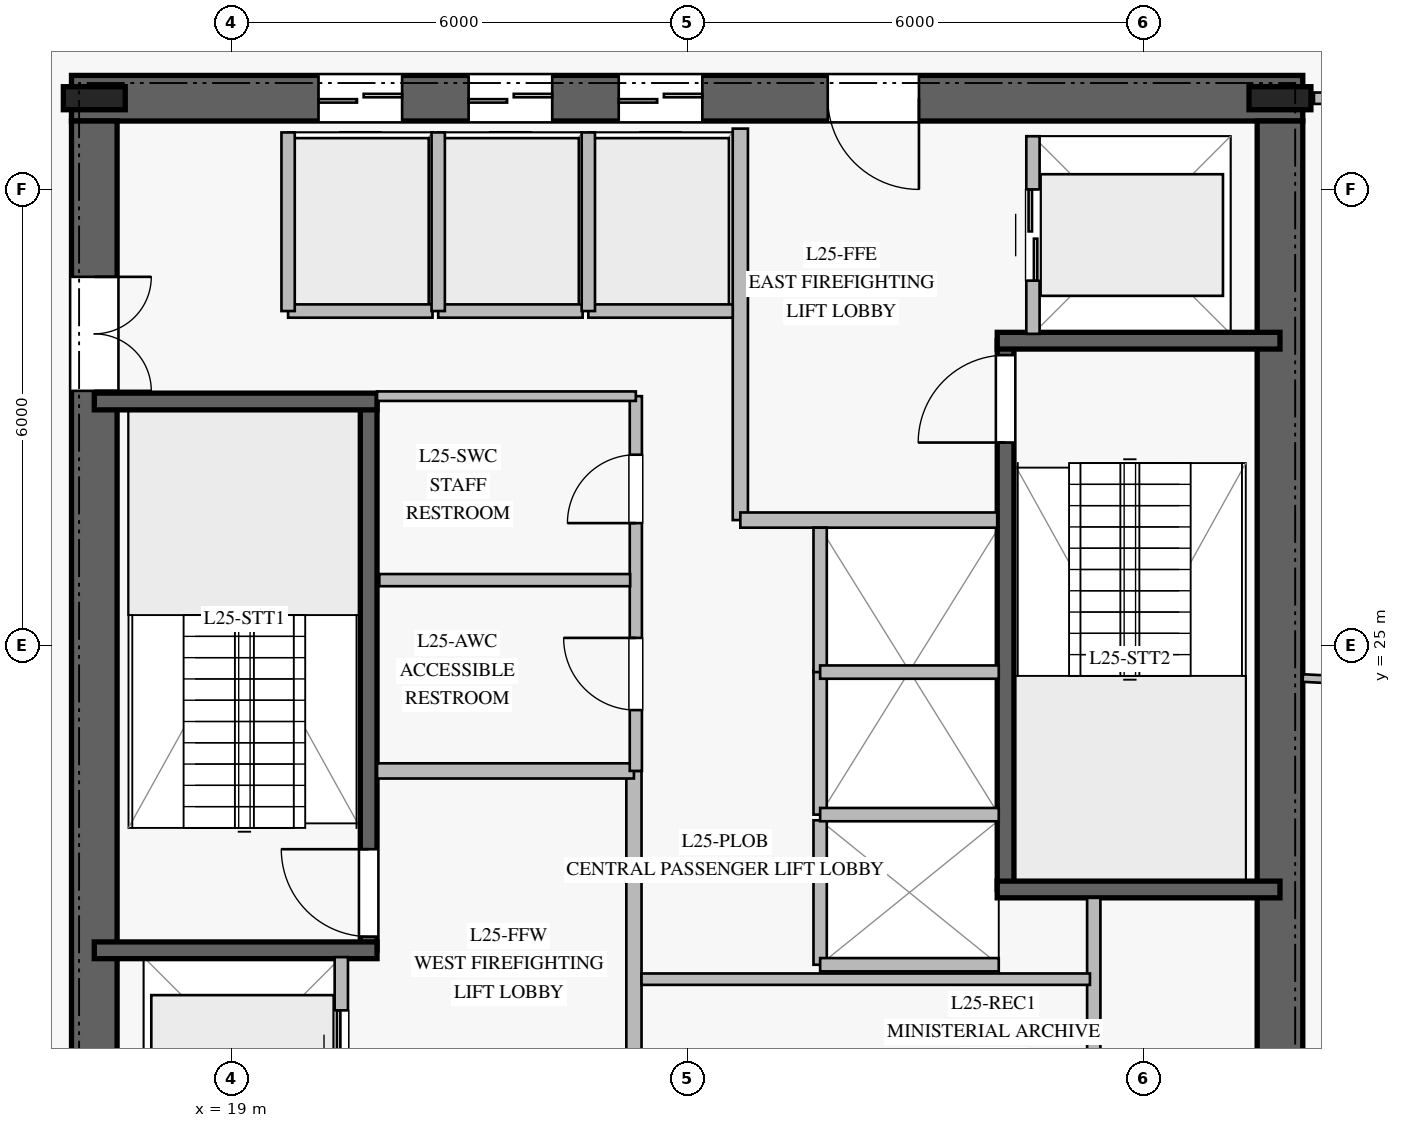
"""IFC4 building model, lengths in metres.
Left out: names, types, materials, properties, quantities, classifications, styles, units other than length and angle.
Written with IfcOpenShell. Run it as: python <this file> out.ifc"""

import sys

from ifc_helpers import new_model, si_unit, direction, frame, frame_2d, origin, origin_2d, place, context, subcontext, project, spatial, rectangle, i_section, extrude, element, fill, save


model = new_model("IFC4")
c1 = context("Model", 3, precision=1e-05, world=origin(), true_north=direction((0.0, 1.0)))
c2 = subcontext(c1, "Body", "Model", "MODEL_VIEW")
j1 = project(units=[si_unit("LENGTHUNIT", "METRE"), si_unit("PLANEANGLEUNIT", "RADIAN")], contexts=[c1])
p1 = place(None, origin())
s1 = spatial("IfcSite", under=j1, at=p1, CompositionType="ELEMENT")
p2 = place(p1, origin())
s2 = spatial("IfcBuilding", under=s1, at=p2, CompositionType="ELEMENT")
p3 = place(p2, frame((0.0, 0.0, 106.4)))
s3 = spatial("IfcBuildingStorey", under=s2, at=p3, CompositionType="ELEMENT", Elevation=106.4)
p4 = place(p3, frame((33.1, 32.2, 0.0), z_axis=(0.0, 0.0, 1.0), x_axis=(-1.0, 0.0, 0.0)))
e1 = element("IfcWall", 1, at=p4, inside=s3, PredefinedType="SHEAR", context=c2, shape_type="SweptSolid", body=[
    extrude(rectangle(XDim=16.2, YDim=0.6, at=frame_2d((8.1, 0.0))), origin(), (0.0, 0.0, 1.0), 3.76),
])
p5 = place(p4, frame((5.05, 0.0, 0.0)))
e2 = element("IfcOpeningElement", 2, at=p5, cuts=e1, PredefinedType="OPENING", context=c2, shape_type="SweptSolid", body=[
    extrude(rectangle(XDim=1.2, YDim=2.25, at=frame_2d((0.6, 1.125))), frame((0.0, 0.31, 0.0), z_axis=(0.0, -1.0, 0.0), x_axis=(1.0, 0.0, 0.0)), (0.0, 0.0, 1.0), 0.62),
])
p6 = place(p4, frame((11.85, 0.0, 0.0)))
e3 = element("IfcOpeningElement", 3, at=p6, cuts=e1, PredefinedType="OPENING", context=c2, shape_type="SweptSolid", body=[
    extrude(rectangle(XDim=1.1, YDim=2.2, at=frame_2d((0.55, 1.1))), frame((0.0, 0.31, 0.0), z_axis=(0.0, -1.0, 0.0), x_axis=(1.0, 0.0, 0.0)), (0.0, 0.0, 1.0), 0.62),
])
p7 = place(p4, frame((9.875, 0.0, 0.0)))
e4 = element("IfcOpeningElement", 4, at=p7, cuts=e1, PredefinedType="OPENING", context=c2, shape_type="SweptSolid", body=[
    extrude(rectangle(XDim=1.1, YDim=2.2, at=frame_2d((0.55, 1.1))), frame((0.0, 0.31, 0.0), z_axis=(0.0, -1.0, 0.0), x_axis=(1.0, 0.0, 0.0)), (0.0, 0.0, 1.0), 0.62),
])
p8 = place(p4, frame((7.9, 0.0, 0.0)))
e5 = element("IfcOpeningElement", 5, at=p8, cuts=e1, PredefinedType="OPENING", context=c2, shape_type="SweptSolid", body=[
    extrude(rectangle(XDim=1.1, YDim=2.2, at=frame_2d((0.55, 1.1))), frame((0.0, 0.31, 0.0), z_axis=(0.0, -1.0, 0.0), x_axis=(1.0, 0.0, 0.0)), (0.0, 0.0, 1.0), 0.62),
])
p9 = place(p3, frame((17.2, 31.9, 0.0), z_axis=(0.0, 0.0, 1.0), x_axis=(0.0, -1.0, 0.0)))
e6 = element("IfcWall", 6, at=p9, inside=s3, PredefinedType="SHEAR", context=c2, shape_type="SweptSolid", body=[
    extrude(rectangle(XDim=13.8, YDim=0.6, at=frame_2d((6.9, 0.0))), origin(), (0.0, 0.0, 1.0), 3.76),
])
p10 = place(p9, frame((2.05, 0.0, 0.0)))
e7 = element("IfcOpeningElement", 7, at=p10, cuts=e6, PredefinedType="OPENING", context=c2, shape_type="SweptSolid", body=[
    extrude(rectangle(XDim=1.5, YDim=2.2, at=frame_2d((0.75, 1.1))), frame((0.0, 0.31, 0.0), z_axis=(0.0, -1.0, 0.0), x_axis=(1.0, 0.0, 0.0)), (0.0, 0.0, 1.0), 0.62),
])
p11 = place(p3, frame((32.8, 18.1, 0.0), z_axis=(0.0, 0.0, 1.0), x_axis=(0.0, 1.0, 0.0)))
e8 = element("IfcWall", 8, at=p11, inside=s3, PredefinedType="SHEAR", context=c2, shape_type="SweptSolid", body=[
    extrude(rectangle(XDim=13.8, YDim=0.6, at=frame_2d((6.9, 0.0))), origin(), (0.0, 0.0, 1.0), 3.76),
])
for number, where, z_axis, x_axis in (
    (9, (32.8, 32.2, 0.0), (0.0, 0.0, 1.0), (1.0, 0.0, 0.0)),
    (10, (17.2, 32.2, 0.0), (0.0, 0.0, 1.0), (1.0, 0.0, 0.0)),
):
    element("IfcColumn", number, at=place(p3, frame(where, z_axis=z_axis, x_axis=x_axis)), inside=s3, PredefinedType="COLUMN", context=c2, shape_type="SweptSolid", body=[
        extrude(i_section(OverallWidth=0.303, OverallDepth=0.814, WebThickness=0.021, FlangeThickness=0.04, at=origin_2d()), origin(), (0.0, 0.0, 1.0), 4.0),
    ])
p12 = place(p3, frame((20.81, 20.99, 0.0), z_axis=(0.0, 0.0, 1.0), x_axis=(0.0, 1.0, 0.0)))
e11 = element("IfcWall", 11, at=p12, inside=s3, PredefinedType="SOLIDWALL", context=c2, shape_type="SweptSolid", body=[
    extrude(rectangle(XDim=7.22, YDim=0.22, at=frame_2d((3.61, 0.0))), origin(), (0.0, 0.0, 1.0), 3.76),
])
p13 = place(p12, frame((0.18, 0.0, 0.0)))
e12 = element("IfcOpeningElement", 12, at=p13, cuts=e11, PredefinedType="OPENING", context=c2, shape_type="SweptSolid", body=[
    extrude(rectangle(XDim=1.15, YDim=2.2, at=frame_2d((0.575, 1.1))), frame((0.0, 0.12, 0.0), z_axis=(0.0, -1.0, 0.0), x_axis=(1.0, 0.0, 0.0)), (0.0, 0.0, 1.0), 0.24),
])
for number, where, z_axis, x_axis in (
    (13, (17.2, 20.99, 0.0), (0.0, 0.0, 1.0), (1.0, 0.0, 0.0)),
    (14, (17.2, 28.21, 0.0), (0.0, 0.0, 1.0), (1.0, 0.0, 0.0)),
):
    element("IfcWall", number, at=place(p3, frame(where, z_axis=z_axis, x_axis=x_axis)), inside=s3, PredefinedType="SOLIDWALL", context=c2, shape_type="SweptSolid", body=[
        extrude(rectangle(XDim=3.72, YDim=0.22, at=frame_2d((1.86, 0.0))), origin(), (0.0, 0.0, 1.0), 3.76),
    ])
p14 = place(p3, frame((29.19, 21.79, 0.0), z_axis=(0.0, 0.0, 1.0), x_axis=(0.0, 1.0, 0.0)))
e15 = element("IfcWall", 15, at=p14, inside=s3, PredefinedType="SOLIDWALL", context=c2, shape_type="SweptSolid", body=[
    extrude(rectangle(XDim=7.22, YDim=0.22, at=frame_2d((3.61, 0.0))), origin(), (0.0, 0.0, 1.0), 3.76),
])
p15 = place(p14, frame((5.88, 0.0, 0.0)))
e16 = element("IfcOpeningElement", 16, at=p15, cuts=e15, PredefinedType="OPENING", context=c2, shape_type="SweptSolid", body=[
    extrude(rectangle(XDim=1.15, YDim=2.2, at=frame_2d((0.575, 1.1))), frame((0.0, 0.12, 0.0), z_axis=(0.0, -1.0, 0.0), x_axis=(1.0, 0.0, 0.0)), (0.0, 0.0, 1.0), 0.24),
])
for number, where, z_axis, x_axis in (
    (17, (29.08, 21.79, 0.0), (0.0, 0.0, 1.0), (1.0, 0.0, 0.0)),
    (18, (29.08, 29.01, 0.0), (0.0, 0.0, 1.0), (1.0, 0.0, 0.0)),
):
    element("IfcWall", number, at=place(p3, frame(where, z_axis=z_axis, x_axis=x_axis)), inside=s3, PredefinedType="SOLIDWALL", context=c2, shape_type="SweptSolid", body=[
        extrude(rectangle(XDim=3.72, YDim=0.22, at=frame_2d((1.86, 0.0))), origin(), (0.0, 0.0, 1.0), 3.76),
    ])
p16 = place(p3, frame((24.3, 18.2, 0.0), z_axis=(0.0, 0.0, 1.0), x_axis=(0.0, 1.0, 0.0)))
e19 = element("IfcWall", 19, at=p16, inside=s3, PredefinedType="PARTITIONING", context=c2, shape_type="SweptSolid", body=[
    extrude(rectangle(XDim=5.15, YDim=0.2, at=frame_2d((2.575, 0.0))), origin(), (0.0, 0.0, 1.0), 3.76),
])
p17 = place(p3, frame((20.92, 23.35, 0.0), z_axis=(0.0, 0.0, 1.0), x_axis=(1.0, 0.0, 0.0)))
e20 = element("IfcWall", 20, at=p17, inside=s3, PredefinedType="PARTITIONING", context=c2, shape_type="SweptSolid", body=[
    extrude(rectangle(XDim=3.38, YDim=0.2, at=frame_2d((1.69, 0.0))), origin(), (0.0, 0.0, 1.0), 3.76),
])
p18 = place(p3, frame((25.7, 26.65, 0.0), z_axis=(0.0, 0.0, 1.0), x_axis=(0.0, 1.0, 0.0)))
e21 = element("IfcWall", 21, at=p18, inside=s3, PredefinedType="PARTITIONING", context=c2, shape_type="SweptSolid", body=[
    extrude(rectangle(XDim=5.15, YDim=0.2, at=frame_2d((2.575, 0.0))), origin(), (0.0, 0.0, 1.0), 3.76),
])
p19 = place(p3, frame((25.7, 26.65, 0.0), z_axis=(0.0, 0.0, 1.0), x_axis=(1.0, 0.0, 0.0)))
e22 = element("IfcWall", 22, at=p19, inside=s3, PredefinedType="PARTITIONING", context=c2, shape_type="SweptSolid", body=[
    extrude(rectangle(XDim=3.38, YDim=0.2, at=frame_2d((1.69, 0.0))), origin(), (0.0, 0.0, 1.0), 3.76),
])
p20 = place(p3, frame((24.325, 23.35, 0.0), z_axis=(0.0, 0.0, 1.0), x_axis=(0.0, 1.0, 0.0)))
e23 = element("IfcWall", 23, at=p20, inside=s3, PredefinedType="PLUMBINGWALL", context=c2, shape_type="SweptSolid", body=[
    extrude(rectangle(XDim=4.93, YDim=0.16, at=frame_2d((2.465, 0.0))), origin(), (0.0, 0.0, 1.0), 3.76),
])
p21 = place(p20, frame((0.8, 0.0, 0.0)))
e24 = element("IfcOpeningElement", 24, at=p21, cuts=e23, PredefinedType="OPENING", context=c2, shape_type="SweptSolid", body=[
    extrude(rectangle(XDim=0.95, YDim=2.1, at=frame_2d((0.475, 1.05))), frame((0.0, 0.09, 0.0), z_axis=(0.0, -1.0, 0.0), x_axis=(1.0, 0.0, 0.0)), (0.0, 0.0, 1.0), 0.18),
])
p22 = place(p20, frame((3.26, 0.0, 0.0)))
e25 = element("IfcOpeningElement", 25, at=p22, cuts=e23, PredefinedType="OPENING", context=c2, shape_type="SweptSolid", body=[
    extrude(rectangle(XDim=0.9, YDim=2.1, at=frame_2d((0.45, 1.05))), frame((0.0, 0.09, 0.0), z_axis=(0.0, -1.0, 0.0), x_axis=(1.0, 0.0, 0.0)), (0.0, 0.0, 1.0), 0.18),
])
p23 = place(p3, frame((20.92, 28.28, 0.0), z_axis=(0.0, 0.0, 1.0), x_axis=(1.0, 0.0, 0.0)))
e26 = element("IfcWall", 26, at=p23, inside=s3, PredefinedType="PARTITIONING", context=c2, shape_type="SweptSolid", body=[
    extrude(rectangle(XDim=3.405, YDim=0.125, at=frame_2d((1.703, 0.0))), origin(), (0.0, 0.0, 1.0), 3.76),
])
p24 = place(p3, frame((20.95, 25.86, 0.0), z_axis=(0.0, 0.0, 1.0), x_axis=(1.0, 0.0, 0.0)))
e27 = element("IfcWall", 27, at=p24, inside=s3, PredefinedType="PLUMBINGWALL", context=c2, shape_type="SweptSolid", body=[
    extrude(rectangle(XDim=3.3, YDim=0.16, at=frame_2d((1.65, 0.0))), origin(), (0.0, 0.0, 1.0), 3.76),
])
p25 = place(p3, frame((30.35, 18.2, 0.0), z_axis=(0.0, 0.0, 1.0), x_axis=(0.0, 1.0, 0.0)))
e28 = element("IfcWall", 28, at=p25, inside=s3, PredefinedType="PARTITIONING", context=c2, shape_type="SweptSolid", body=[
    extrude(rectangle(XDim=3.48, YDim=0.175, at=frame_2d((1.74, 0.0))), origin(), (0.0, 0.0, 1.0), 3.76),
])
p26 = place(p3, frame((24.4, 20.61, 0.0), z_axis=(0.0, 0.0, 1.0), x_axis=(1.0, 0.0, 0.0)))
e29 = element("IfcWall", 29, at=p26, inside=s3, PredefinedType="PARTITIONING", context=c2, shape_type="SweptSolid", body=[
    extrude(rectangle(XDim=5.9, YDim=0.15, at=frame_2d((2.95, 0.0))), origin(), (0.0, 0.0, 1.0), 3.76),
])
p27 = place(p3, frame((19.75, 29.4, 0.0), z_axis=(0.0, 0.0, 1.0), x_axis=(1.0, 0.0, 0.0)))
e30 = element("IfcWall", 30, at=p27, inside=s3, PredefinedType="PARTITIONING", context=c2, shape_type="SweptSolid", body=[
    extrude(rectangle(XDim=1.9, YDim=0.175, at=frame_2d((0.95, 0.0))), origin(), (0.0, 0.0, 1.0), 3.76),
])
p28 = place(p3, frame((19.75, 29.4, 0.0), z_axis=(0.0, 0.0, 1.0), x_axis=(0.0, 1.0, 0.0)))
e31 = element("IfcWall", 31, at=p28, inside=s3, PredefinedType="PARTITIONING", context=c2, shape_type="SweptSolid", body=[
    extrude(rectangle(XDim=2.35, YDim=0.175, at=frame_2d((1.175, 0.0))), origin(), (0.0, 0.0, 1.0), 3.76),
])
p29 = place(p3, frame((21.725, 29.4, 0.0), z_axis=(0.0, 0.0, 1.0), x_axis=(1.0, 0.0, 0.0)))
e32 = element("IfcWall", 32, at=p29, inside=s3, PredefinedType="PARTITIONING", context=c2, shape_type="SweptSolid", body=[
    extrude(rectangle(XDim=1.9, YDim=0.175, at=frame_2d((0.95, 0.0))), origin(), (0.0, 0.0, 1.0), 3.76),
])
p30 = place(p3, frame((21.725, 29.4, 0.0), z_axis=(0.0, 0.0, 1.0), x_axis=(0.0, 1.0, 0.0)))
e33 = element("IfcWall", 33, at=p30, inside=s3, PredefinedType="PARTITIONING", context=c2, shape_type="SweptSolid", body=[
    extrude(rectangle(XDim=2.35, YDim=0.175, at=frame_2d((1.175, 0.0))), origin(), (0.0, 0.0, 1.0), 3.76),
])
p31 = place(p3, frame((23.7, 29.4, 0.0), z_axis=(0.0, 0.0, 1.0), x_axis=(1.0, 0.0, 0.0)))
e34 = element("IfcWall", 34, at=p31, inside=s3, PredefinedType="PARTITIONING", context=c2, shape_type="SweptSolid", body=[
    extrude(rectangle(XDim=1.9, YDim=0.175, at=frame_2d((0.95, 0.0))), origin(), (0.0, 0.0, 1.0), 3.76),
])
p32 = place(p3, frame((23.7, 29.4, 0.0), z_axis=(0.0, 0.0, 1.0), x_axis=(0.0, 1.0, 0.0)))
e35 = element("IfcWall", 35, at=p32, inside=s3, PredefinedType="PARTITIONING", context=c2, shape_type="SweptSolid", body=[
    extrude(rectangle(XDim=2.35, YDim=0.175, at=frame_2d((1.175, 0.0))), origin(), (0.0, 0.0, 1.0), 3.76),
])
p33 = place(p3, frame((26.75, 20.8, 0.0), z_axis=(0.0, 0.0, 1.0), x_axis=(0.0, 1.0, 0.0)))
e36 = element("IfcWall", 36, at=p33, inside=s3, PredefinedType="PARTITIONING", context=c2, shape_type="SweptSolid", body=[
    extrude(rectangle(XDim=1.9, YDim=0.175, at=frame_2d((0.95, 0.0))), origin(), (0.0, 0.0, 1.0), 3.76),
])
p34 = place(p3, frame((26.75, 20.8, 0.0), z_axis=(0.0, 0.0, 1.0), x_axis=(1.0, 0.0, 0.0)))
e37 = element("IfcWall", 37, at=p34, inside=s3, PredefinedType="PARTITIONING", context=c2, shape_type="SweptSolid", body=[
    extrude(rectangle(XDim=2.35, YDim=0.175, at=frame_2d((1.175, 0.0))), origin(), (0.0, 0.0, 1.0), 3.76),
])
p35 = place(p3, frame((26.75, 22.775, 0.0), z_axis=(0.0, 0.0, 1.0), x_axis=(0.0, 1.0, 0.0)))
e38 = element("IfcWall", 38, at=p35, inside=s3, PredefinedType="PARTITIONING", context=c2, shape_type="SweptSolid", body=[
    extrude(rectangle(XDim=1.9, YDim=0.175, at=frame_2d((0.95, 0.0))), origin(), (0.0, 0.0, 1.0), 3.76),
])
p36 = place(p3, frame((26.75, 22.775, 0.0), z_axis=(0.0, 0.0, 1.0), x_axis=(1.0, 0.0, 0.0)))
e39 = element("IfcWall", 39, at=p36, inside=s3, PredefinedType="PARTITIONING", context=c2, shape_type="SweptSolid", body=[
    extrude(rectangle(XDim=2.35, YDim=0.175, at=frame_2d((1.175, 0.0))), origin(), (0.0, 0.0, 1.0), 3.76),
])
p37 = place(p3, frame((26.75, 24.65, 0.0), z_axis=(0.0, 0.0, 1.0), x_axis=(0.0, 1.0, 0.0)))
e40 = element("IfcWall", 40, at=p37, inside=s3, PredefinedType="PARTITIONING", context=c2, shape_type="SweptSolid", body=[
    extrude(rectangle(XDim=1.9, YDim=0.175, at=frame_2d((0.95, 0.0))), origin(), (0.0, 0.0, 1.0), 3.76),
])
p38 = place(p3, frame((26.75, 24.65, 0.0), z_axis=(0.0, 0.0, 1.0), x_axis=(1.0, 0.0, 0.0)))
e41 = element("IfcWall", 41, at=p38, inside=s3, PredefinedType="PARTITIONING", context=c2, shape_type="SweptSolid", body=[
    extrude(rectangle(XDim=2.35, YDim=0.175, at=frame_2d((1.175, 0.0))), origin(), (0.0, 0.0, 1.0), 3.76),
])
p39 = place(p3, frame((20.45, 18.3, 0.0), z_axis=(0.0, 0.0, 1.0), x_axis=(0.0, 1.0, 0.0)))
e42 = element("IfcWall", 42, at=p39, inside=s3, PredefinedType="PARTITIONING", context=c2, shape_type="SweptSolid", body=[
    extrude(rectangle(XDim=2.6, YDim=0.175, at=frame_2d((1.3, 0.0))), origin(), (0.0, 0.0, 1.0), 3.76),
])
p40 = place(p39, frame((0.7, 0.0, 0.0)))
e43 = element("IfcOpeningElement", 43, at=p40, cuts=e42, PredefinedType="OPENING", context=c2, shape_type="SweptSolid", body=[
    extrude(rectangle(XDim=1.2, YDim=2.2, at=frame_2d((0.6, 1.1))), frame((0.0, 0.098, 0.0), z_axis=(0.0, -1.0, 0.0), x_axis=(1.0, 0.0, 0.0)), (0.0, 0.0, 1.0), 0.195),
])
p41 = place(p3, frame((29.55, 29.1, 0.0), z_axis=(0.0, 0.0, 1.0), x_axis=(0.0, 1.0, 0.0)))
e44 = element("IfcWall", 44, at=p41, inside=s3, PredefinedType="PARTITIONING", context=c2, shape_type="SweptSolid", body=[
    extrude(rectangle(XDim=2.6, YDim=0.175, at=frame_2d((1.3, 0.0))), origin(), (0.0, 0.0, 1.0), 3.76),
])
p42 = place(p41, frame((0.7, 0.0, 0.0)))
e45 = element("IfcOpeningElement", 45, at=p42, cuts=e44, PredefinedType="OPENING", context=c2, shape_type="SweptSolid", body=[
    extrude(rectangle(XDim=1.2, YDim=2.2, at=frame_2d((0.6, 1.1))), frame((0.0, 0.098, 0.0), z_axis=(0.0, -1.0, 0.0), x_axis=(1.0, 0.0, 0.0)), (0.0, 0.0, 1.0), 0.195),
])
p43 = place(p3, frame((41.2, 32.2, 0.0), z_axis=(0.0, 0.0, 1.0), x_axis=(-1.0, 0.0, 0.0)))
e46 = element("IfcWall", 46, at=p43, inside=s3, PredefinedType="PARTITIONING", context=c2, shape_type="SweptSolid", body=[
    extrude(rectangle(XDim=7.953, YDim=0.15, at=frame_2d((3.977, 0.0))), origin(), (0.0, 0.0, 1.0), 3.21),
])
p44 = place(p3, frame((33.1, 24.572, 0.0), z_axis=(0.0, 0.0, 1.0), x_axis=(0.998606672966, -0.052770377176, 0.0)))
e47 = element("IfcWall", 47, at=p44, inside=s3, PredefinedType="MOVABLE", context=c2, shape_type="SweptSolid", body=[
    extrude(rectangle(XDim=11.751, YDim=0.1, at=frame_2d((5.875, 0.0))), origin(), (0.0, 0.0, 1.0), 3.16),
])
p45 = place(p13, origin())
e48 = element("IfcDoor", 48, at=p45, inside=s3, OperationType="SINGLE_SWING_RIGHT", PredefinedType="DOOR", context=c2, shape_type="SweptSolid", body=[
    extrude(rectangle(XDim=1.15, YDim=2.2, at=frame_2d((0.575, 1.1))), frame((0.0, 0.025, 0.0), z_axis=(0.0, -1.0, 0.0), x_axis=(1.0, 0.0, 0.0)), (0.0, 0.0, 1.0), 0.05),
])
fill(e12, e48)
p46 = place(p15, origin())
e49 = element("IfcDoor", 49, at=p46, inside=s3, OperationType="SINGLE_SWING_LEFT", PredefinedType="DOOR", context=c2, shape_type="SweptSolid", body=[
    extrude(rectangle(XDim=1.15, YDim=2.2, at=frame_2d((0.575, 1.1))), frame((0.0, 0.025, 0.0), z_axis=(0.0, -1.0, 0.0), x_axis=(1.0, 0.0, 0.0)), (0.0, 0.0, 1.0), 0.05),
])
fill(e16, e49)
p47 = place(p5, origin())
e50 = element("IfcDoor", 50, at=p47, inside=s3, OperationType="SINGLE_SWING_LEFT", PredefinedType="DOOR", context=c2, shape_type="SweptSolid", body=[
    extrude(rectangle(XDim=1.2, YDim=2.25, at=frame_2d((0.6, 1.125))), frame((0.0, 0.025, 0.0), z_axis=(0.0, -1.0, 0.0), x_axis=(1.0, 0.0, 0.0)), (0.0, 0.0, 1.0), 0.05),
])
fill(e2, e50)
p48 = place(p10, origin())
e51 = element("IfcDoor", 51, at=p48, inside=s3, OperationType="DOUBLE_DOOR_SINGLE_SWING", PredefinedType="DOOR", context=c2, shape_type="SweptSolid", body=[
    extrude(rectangle(XDim=1.5, YDim=2.2, at=frame_2d((0.75, 1.1))), frame((0.0, 0.025, 0.0), z_axis=(0.0, -1.0, 0.0), x_axis=(1.0, 0.0, 0.0)), (0.0, 0.0, 1.0), 0.05),
])
fill(e7, e51)
p49 = place(p21, origin())
e52 = element("IfcDoor", 52, at=p49, inside=s3, OperationType="SINGLE_SWING_RIGHT", PredefinedType="DOOR", context=c2, shape_type="SweptSolid", body=[
    extrude(rectangle(XDim=0.95, YDim=2.1, at=frame_2d((0.475, 1.05))), frame((0.0, 0.025, 0.0), z_axis=(0.0, -1.0, 0.0), x_axis=(1.0, 0.0, 0.0)), (0.0, 0.0, 1.0), 0.05),
])
fill(e24, e52)
p50 = place(p22, origin())
e53 = element("IfcDoor", 53, at=p50, inside=s3, OperationType="SINGLE_SWING_LEFT", PredefinedType="DOOR", context=c2, shape_type="SweptSolid", body=[
    extrude(rectangle(XDim=0.9, YDim=2.1, at=frame_2d((0.45, 1.05))), frame((0.0, 0.025, 0.0), z_axis=(0.0, -1.0, 0.0), x_axis=(1.0, 0.0, 0.0)), (0.0, 0.0, 1.0), 0.05),
])
fill(e25, e53)
p51 = place(p6, origin())
e54 = element("IfcDoor", 54, at=p51, inside=s3, OperationType="DOUBLE_DOOR_SLIDING", PredefinedType="DOOR", context=c2, shape_type="SweptSolid", body=[
    extrude(rectangle(XDim=1.1, YDim=2.2, at=frame_2d((0.55, 1.1))), frame((0.0, 0.025, 0.0), z_axis=(0.0, -1.0, 0.0), x_axis=(1.0, 0.0, 0.0)), (0.0, 0.0, 1.0), 0.05),
])
fill(e3, e54)
p52 = place(p7, origin())
e55 = element("IfcDoor", 55, at=p52, inside=s3, OperationType="DOUBLE_DOOR_SLIDING", PredefinedType="DOOR", context=c2, shape_type="SweptSolid", body=[
    extrude(rectangle(XDim=1.1, YDim=2.2, at=frame_2d((0.55, 1.1))), frame((0.0, 0.025, 0.0), z_axis=(0.0, -1.0, 0.0), x_axis=(1.0, 0.0, 0.0)), (0.0, 0.0, 1.0), 0.05),
])
fill(e4, e55)
p53 = place(p8, origin())
e56 = element("IfcDoor", 56, at=p53, inside=s3, OperationType="DOUBLE_DOOR_SLIDING", PredefinedType="DOOR", context=c2, shape_type="SweptSolid", body=[
    extrude(rectangle(XDim=1.1, YDim=2.2, at=frame_2d((0.55, 1.1))), frame((0.0, 0.025, 0.0), z_axis=(0.0, -1.0, 0.0), x_axis=(1.0, 0.0, 0.0)), (0.0, 0.0, 1.0), 0.05),
])
fill(e5, e56)
p54 = place(p40, origin())
e57 = element("IfcDoor", 57, at=p54, inside=s3, OperationType="DOUBLE_DOOR_SLIDING", PredefinedType="DOOR", context=c2, shape_type="SweptSolid", body=[
    extrude(rectangle(XDim=1.2, YDim=2.2, at=frame_2d((0.6, 1.1))), frame((0.0, 0.025, 0.0), z_axis=(0.0, -1.0, 0.0), x_axis=(1.0, 0.0, 0.0)), (0.0, 0.0, 1.0), 0.05),
])
fill(e43, e57)
p55 = place(p42, origin())
e58 = element("IfcDoor", 58, at=p55, inside=s3, OperationType="DOUBLE_DOOR_SLIDING", PredefinedType="DOOR", context=c2, shape_type="SweptSolid", body=[
    extrude(rectangle(XDim=1.2, YDim=2.2, at=frame_2d((0.6, 1.1))), frame((0.0, 0.025, 0.0), z_axis=(0.0, -1.0, 0.0), x_axis=(1.0, 0.0, 0.0)), (0.0, 0.0, 1.0), 0.05),
])
fill(e45, e58)
save(model, sys.argv[1])
